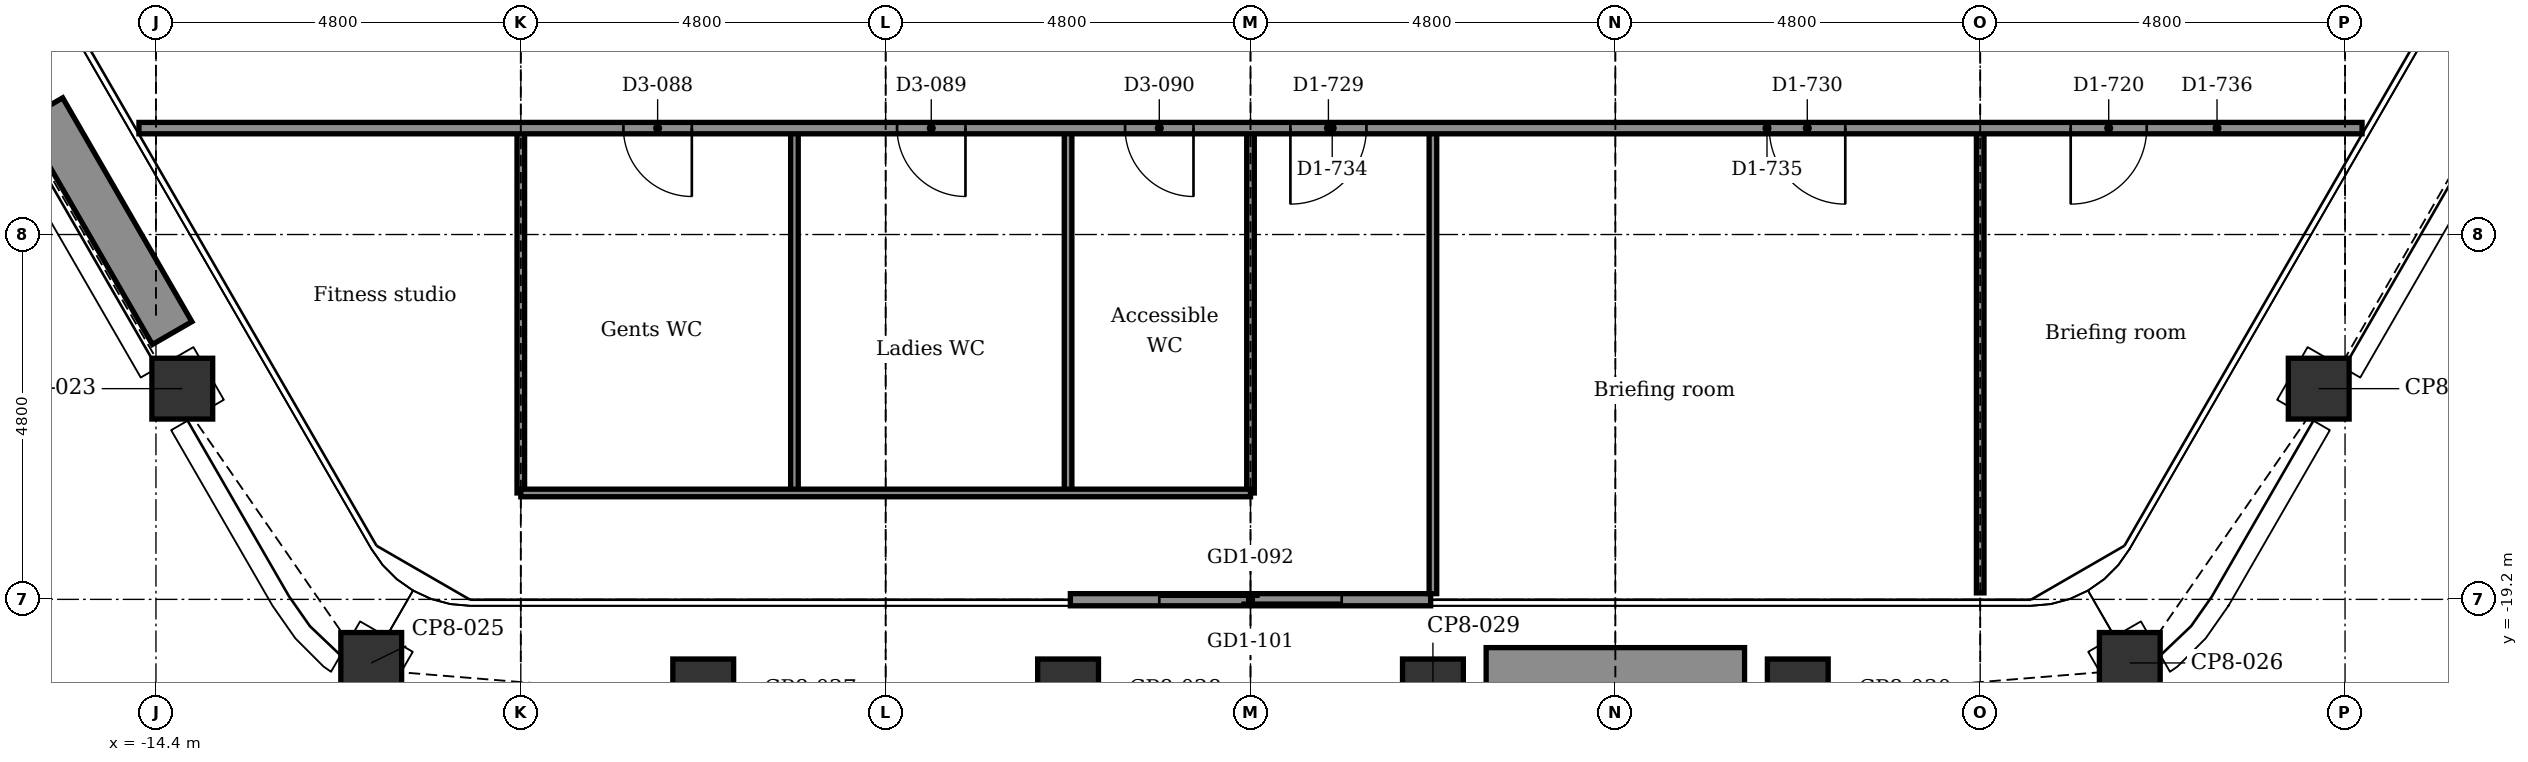
"""IFC4 building model, lengths in metres.
Left out: names, types, materials, properties, quantities, classifications, styles, units other than length and angle.
Written with IfcOpenShell. Run it as: python <this file> out.ifc"""

import sys

from ifc_helpers import new_model, si_unit, direction, frame, frame_2d, origin, origin_2d, place, context, subcontext, project, spatial, rectangle, extrude, element, fill, save


model = new_model("IFC4")
c1 = context("Model", 3, precision=1e-05, world=origin(), true_north=direction((0.0, 1.0)))
c2 = subcontext(c1, "Body", "Model", "MODEL_VIEW")
j1 = project(units=[si_unit("LENGTHUNIT", "METRE"), si_unit("PLANEANGLEUNIT", "RADIAN")], contexts=[c1])
p1 = place(None, origin())
s1 = spatial("IfcSite", under=j1, at=p1, CompositionType="ELEMENT")
p2 = place(p1, origin())
s2 = spatial("IfcBuilding", under=s1, at=p2, CompositionType="ELEMENT")
p3 = place(p2, frame((0.0, 0.0, 273.5)))
s3 = spatial("IfcBuildingStorey", under=s2, at=p3, CompositionType="ELEMENT", Elevation=273.5)
for number, where, z_axis, x_axis in (
    (1, (14.054, -16.428, -0.15), (0.0, 0.0, 1.0), (0.5, 0.866, 0.0)),
    (2, (11.568, -20.036, -0.15), (0.0, 0.0, 1.0), (0.866, 0.5, 0.0)),
    (3, (7.2, -20.385, -0.15), (0.0, 0.0, 1.0), (1.0, 0.0, 0.0)),
    (4, (2.4, -20.385, -0.15), (0.0, 0.0, 1.0), (1.0, 0.0, 0.0)),
    (5, (-2.4, -20.385, -0.15), (0.0, 0.0, 1.0), (1.0, 0.0, 0.0)),
    (6, (-7.2, -20.385, -0.15), (0.0, 0.0, 1.0), (1.0, 0.0, 0.0)),
    (7, (-11.568, -20.036, -0.15), (0.0, 0.0, 1.0), (0.5, 0.866, 0.0)),
    (8, (-14.054, -16.428, -0.15), (0.0, 0.0, 1.0), (0.866, 0.5, 0.0)),
):
    element("IfcColumn", number, at=place(p3, frame(where, z_axis=z_axis, x_axis=x_axis)), inside=s3, PredefinedType="COLUMN", context=c2, shape_type="SweptSolid", body=[
        extrude(rectangle(XDim=0.8, YDim=0.8, at=origin_2d()), origin(), (0.0, 0.0, 1.0), 3.9),
    ])
p4 = place(p3, frame((2.37, -19.205, 0.0), z_axis=(0.0, 0.0, 1.0), x_axis=(-1.0, 0.0, 0.0)))
e9 = element("IfcWall", 9, at=p4, inside=s3, PredefinedType="PARTITIONING", context=c2, shape_type="SweptSolid", body=[
    extrude(rectangle(XDim=4.74, YDim=0.16, at=frame_2d((2.37, 0.0))), origin(), (0.0, 0.0, 1.0), 3.75),
])
p5 = place(p4, frame((1.17, 0.0, 0.0)))
e10 = element("IfcOpeningElement", 10, at=p5, cuts=e9, PredefinedType="OPENING", context=c2, shape_type="SweptSolid", body=[
    extrude(rectangle(XDim=2.4, YDim=2.4, at=frame_2d((1.2, 1.2))), frame((0.0, 0.09, 0.0), z_axis=(0.0, -1.0, 0.0), x_axis=(1.0, 0.0, 0.0)), (0.0, 0.0, 1.0), 0.18),
])
p6 = place(p3, frame((6.5, -20.135, 0.0), z_axis=(0.0, 0.0, 1.0), x_axis=(-1.0, 0.0, 0.0)))
e11 = element("IfcWall", 11, at=p6, inside=s3, PredefinedType="USERDEFINED", context=c2, shape_type="SweptSolid", body=[
    extrude(rectangle(XDim=3.4, YDim=0.6, at=frame_2d((1.7, 0.0))), origin(), (0.0, 0.0, 1.0), 0.7),
])
p7 = place(p3, frame((-14.187, -15.697, 0.0), z_axis=(0.0, 0.0, 1.0), x_axis=(-0.499977295307, 0.866038511948, 0.0)))
e12 = element("IfcWall", 12, at=p7, inside=s3, PredefinedType="USERDEFINED", context=c2, shape_type="SweptSolid", body=[
    extrude(rectangle(XDim=3.4, YDim=0.6, at=frame_2d((1.7, 0.0))), origin(), (0.0, 0.0, 1.0), 0.7),
])
p8 = place(p3, frame((9.6, -19.115, 0.0), z_axis=(0.0, 0.0, 1.0), x_axis=(0.0, 1.0, 0.0)))
e13 = element("IfcWall", 13, at=p8, inside=s3, PredefinedType="PARTITIONING", context=c2, shape_type="SweptSolid", body=[
    extrude(rectangle(XDim=6.115, YDim=0.1, at=frame_2d((3.057, 0.0))), origin(), (0.0, 0.0, 1.0), 3.293),
])
p9 = place(p3, frame((2.4, -19.125, 0.0), z_axis=(0.0, 0.0, 1.0), x_axis=(0.0, 1.0, 0.0)))
e14 = element("IfcWall", 14, at=p9, inside=s3, PredefinedType="PARTITIONING", context=c2, shape_type="SweptSolid", body=[
    extrude(rectangle(XDim=6.125, YDim=0.1, at=frame_2d((3.062, 0.0))), origin(), (0.0, 0.0, 1.0), 3.75),
])
p10 = place(p3, frame((0.0, -17.8, 0.0), z_axis=(0.0, 0.0, 1.0), x_axis=(0.0, 1.0, 0.0)))
e15 = element("IfcWall", 15, at=p10, inside=s3, PredefinedType="PARTITIONING", context=c2, shape_type="SweptSolid", body=[
    extrude(rectangle(XDim=4.8, YDim=0.1, at=frame_2d((2.4, 0.0))), origin(), (0.0, 0.0, 1.0), 3.217),
])
for number, where, z_axis, x_axis in (
    (16, (-2.4, -17.8, 0.0), (0.0, 0.0, 1.0), (0.0, 1.0, 0.0)),
    (17, (-6.0, -17.8, 0.0), (0.0, 0.0, 1.0), (0.0, 1.0, 0.0)),
):
    element("IfcWall", number, at=place(p3, frame(where, z_axis=z_axis, x_axis=x_axis)), inside=s3, PredefinedType="PARTITIONING", context=c2, shape_type="SweptSolid", body=[
        extrude(rectangle(XDim=4.8, YDim=0.1, at=frame_2d((2.4, 0.0))), origin(), (0.0, 0.0, 1.0), 3.75),
    ])
p11 = place(p3, frame((-9.6, -17.8, 0.0), z_axis=(0.0, 0.0, 1.0), x_axis=(0.0, 1.0, 0.0)))
e18 = element("IfcWall", 18, at=p11, inside=s3, PredefinedType="PARTITIONING", context=c2, shape_type="SweptSolid", body=[
    extrude(rectangle(XDim=4.8, YDim=0.1, at=frame_2d((2.4, 0.0))), origin(), (0.0, 0.0, 1.0), 3.293),
])
p12 = place(p3, frame((-9.6, -17.8, 0.0), z_axis=(0.0, 0.0, 1.0), x_axis=(1.0, 0.0, 0.0)))
e19 = element("IfcWall", 19, at=p12, inside=s3, PredefinedType="PARTITIONING", context=c2, shape_type="SweptSolid", body=[
    extrude(rectangle(XDim=9.6, YDim=0.1, at=frame_2d((4.8, 0.0))), origin(), (0.0, 0.0, 1.0), 3.75),
])
p13 = place(p3, frame((-14.624, -13.0, 0.0), z_axis=(0.0, 0.0, 1.0), x_axis=(1.0, 0.0, 0.0)))
e20 = element("IfcWall", 20, at=p13, inside=s3, PredefinedType="PARTITIONING", context=c2, shape_type="SweptSolid", body=[
    extrude(rectangle(XDim=29.248, YDim=0.15, at=frame_2d((14.624, 0.0))), origin(), (0.0, 0.0, 1.0), 3.75),
])
p14 = place(p13, frame((6.374, 0.0, 0.0)))
e21 = element("IfcOpeningElement", 21, at=p14, cuts=e20, PredefinedType="OPENING", context=c2, shape_type="SweptSolid", body=[
    extrude(rectangle(XDim=0.9, YDim=2.1, at=frame_2d((0.45, 1.05))), frame((0.0, 0.085, 0.0), z_axis=(0.0, -1.0, 0.0), x_axis=(1.0, 0.0, 0.0)), (0.0, 0.0, 1.0), 0.17),
])
p15 = place(p13, frame((9.974, 0.0, 0.0)))
e22 = element("IfcOpeningElement", 22, at=p15, cuts=e20, PredefinedType="OPENING", context=c2, shape_type="SweptSolid", body=[
    extrude(rectangle(XDim=0.9, YDim=2.1, at=frame_2d((0.45, 1.05))), frame((0.0, 0.085, 0.0), z_axis=(0.0, -1.0, 0.0), x_axis=(1.0, 0.0, 0.0)), (0.0, 0.0, 1.0), 0.17),
])
p16 = place(p13, frame((12.974, 0.0, 0.0)))
e23 = element("IfcOpeningElement", 23, at=p16, cuts=e20, PredefinedType="OPENING", context=c2, shape_type="SweptSolid", body=[
    extrude(rectangle(XDim=0.9, YDim=2.1, at=frame_2d((0.45, 1.05))), frame((0.0, 0.085, 0.0), z_axis=(0.0, -1.0, 0.0), x_axis=(1.0, 0.0, 0.0)), (0.0, 0.0, 1.0), 0.17),
])
p17 = place(p13, frame((15.149, 0.0, 0.0)))
e24 = element("IfcOpeningElement", 24, at=p17, cuts=e20, PredefinedType="OPENING", context=c2, shape_type="SweptSolid", body=[
    extrude(rectangle(XDim=1.0, YDim=2.1, at=frame_2d((0.5, 1.05))), frame((0.0, 0.085, 0.0), z_axis=(0.0, -1.0, 0.0), x_axis=(1.0, 0.0, 0.0)), (0.0, 0.0, 1.0), 0.17),
])
p18 = place(p13, frame((21.449, 0.0, 0.0)))
e25 = element("IfcOpeningElement", 25, at=p18, cuts=e20, PredefinedType="OPENING", context=c2, shape_type="SweptSolid", body=[
    extrude(rectangle(XDim=1.0, YDim=2.1, at=frame_2d((0.5, 1.05))), frame((0.0, 0.085, 0.0), z_axis=(0.0, -1.0, 0.0), x_axis=(1.0, 0.0, 0.0)), (0.0, 0.0, 1.0), 0.17),
])
p19 = place(p13, frame((25.414, 0.0, 0.0)))
e26 = element("IfcOpeningElement", 26, at=p19, cuts=e20, PredefinedType="OPENING", context=c2, shape_type="SweptSolid", body=[
    extrude(rectangle(XDim=1.0, YDim=2.1, at=frame_2d((0.5, 1.05))), frame((0.0, 0.085, 0.0), z_axis=(0.0, -1.0, 0.0), x_axis=(1.0, 0.0, 0.0)), (0.0, 0.0, 1.0), 0.17),
])
p20 = place(p5, origin())
e27 = element("IfcDoor", 27, at=p20, inside=s3, OperationType="DOUBLE_DOOR_SLIDING", PredefinedType="DOOR", context=c2, shape_type="SweptSolid", body=[
    extrude(rectangle(XDim=2.4, YDim=2.4, at=frame_2d((1.2, 1.2))), frame((0.0, 0.025, 0.0), z_axis=(0.0, -1.0, 0.0), x_axis=(1.0, 0.0, 0.0)), (0.0, 0.0, 1.0), 0.05),
])
fill(e10, e27)
p21 = place(p14, frame((0.9, 0.0, 0.0), z_axis=(0.0, 0.0, 1.0), x_axis=(-1.0, 0.0, 0.0)))
e28 = element("IfcDoor", 28, at=p21, inside=s3, OperationType="SINGLE_SWING_RIGHT", PredefinedType="DOOR", context=c2, shape_type="SweptSolid", body=[
    extrude(rectangle(XDim=0.9, YDim=2.1, at=frame_2d((0.45, 1.05))), frame((0.0, 0.025, 0.0), z_axis=(0.0, -1.0, 0.0), x_axis=(1.0, 0.0, 0.0)), (0.0, 0.0, 1.0), 0.05),
])
fill(e21, e28)
p22 = place(p15, frame((0.9, 0.0, 0.0), z_axis=(0.0, 0.0, 1.0), x_axis=(-1.0, 0.0, 0.0)))
e29 = element("IfcDoor", 29, at=p22, inside=s3, OperationType="SINGLE_SWING_RIGHT", PredefinedType="DOOR", context=c2, shape_type="SweptSolid", body=[
    extrude(rectangle(XDim=0.9, YDim=2.1, at=frame_2d((0.45, 1.05))), frame((0.0, 0.025, 0.0), z_axis=(0.0, -1.0, 0.0), x_axis=(1.0, 0.0, 0.0)), (0.0, 0.0, 1.0), 0.05),
])
fill(e22, e29)
p23 = place(p16, frame((0.9, 0.0, 0.0), z_axis=(0.0, 0.0, 1.0), x_axis=(-1.0, 0.0, 0.0)))
e30 = element("IfcDoor", 30, at=p23, inside=s3, OperationType="SINGLE_SWING_RIGHT", PredefinedType="DOOR", context=c2, shape_type="SweptSolid", body=[
    extrude(rectangle(XDim=0.9, YDim=2.1, at=frame_2d((0.45, 1.05))), frame((0.0, 0.025, 0.0), z_axis=(0.0, -1.0, 0.0), x_axis=(1.0, 0.0, 0.0)), (0.0, 0.0, 1.0), 0.05),
])
fill(e23, e30)
p24 = place(p17, frame((1.0, 0.0, 0.0), z_axis=(0.0, 0.0, 1.0), x_axis=(-1.0, 0.0, 0.0)))
e31 = element("IfcDoor", 31, at=p24, inside=s3, OperationType="SINGLE_SWING_LEFT", PredefinedType="DOOR", context=c2, shape_type="SweptSolid", body=[
    extrude(rectangle(XDim=1.0, YDim=2.1, at=frame_2d((0.5, 1.05))), frame((0.0, 0.025, 0.0), z_axis=(0.0, -1.0, 0.0), x_axis=(1.0, 0.0, 0.0)), (0.0, 0.0, 1.0), 0.05),
])
fill(e24, e31)
p25 = place(p18, frame((1.0, 0.0, 0.0), z_axis=(0.0, 0.0, 1.0), x_axis=(-1.0, 0.0, 0.0)))
e32 = element("IfcDoor", 32, at=p25, inside=s3, OperationType="SINGLE_SWING_RIGHT", PredefinedType="DOOR", context=c2, shape_type="SweptSolid", body=[
    extrude(rectangle(XDim=1.0, YDim=2.1, at=frame_2d((0.5, 1.05))), frame((0.0, 0.025, 0.0), z_axis=(0.0, -1.0, 0.0), x_axis=(1.0, 0.0, 0.0)), (0.0, 0.0, 1.0), 0.05),
])
fill(e25, e32)
p26 = place(p19, frame((1.0, 0.0, 0.0), z_axis=(0.0, 0.0, 1.0), x_axis=(-1.0, 0.0, 0.0)))
e33 = element("IfcDoor", 33, at=p26, inside=s3, OperationType="SINGLE_SWING_LEFT", PredefinedType="DOOR", context=c2, shape_type="SweptSolid", body=[
    extrude(rectangle(XDim=1.0, YDim=2.1, at=frame_2d((0.5, 1.05))), frame((0.0, 0.025, 0.0), z_axis=(0.0, -1.0, 0.0), x_axis=(1.0, 0.0, 0.0)), (0.0, 0.0, 1.0), 0.05),
])
fill(e26, e33)
save(model, sys.argv[1])
